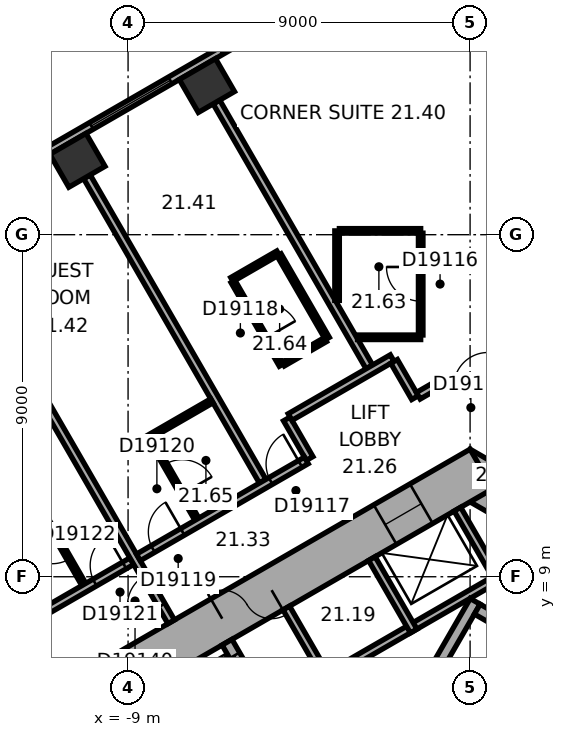
"""IFC4 building model, lengths in metres.
Left out: names, types, materials, properties, quantities, classifications, styles, units other than length and angle.
Written with IfcOpenShell. Run it as: python <this file> out.ifc"""

import sys

from ifc_helpers import new_model, si_unit, direction, frame, frame_2d, origin, origin_2d, place, context, subcontext, project, spatial, rectangle, extrude, element, fill, save


model = new_model("IFC4")
c1 = context("Model", 3, precision=1e-05, world=origin(), true_north=direction((0.0, 1.0)))
c2 = subcontext(c1, "Body", "Model", "MODEL_VIEW")
j1 = project(units=[si_unit("LENGTHUNIT", "METRE"), si_unit("PLANEANGLEUNIT", "RADIAN")], contexts=[c1])
p1 = place(None, origin())
s1 = spatial("IfcSite", under=j1, at=p1, CompositionType="ELEMENT")
p2 = place(p1, origin())
s2 = spatial("IfcBuilding", under=s1, at=p2, CompositionType="ELEMENT")
p3 = place(p2, frame((0.0, 0.0, 93.5)))
s3 = spatial("IfcBuildingStorey", under=s2, at=p3, CompositionType="ELEMENT", Elevation=93.5)
for number, where, z_axis, x_axis in (
    (1, (-6.926, 21.925, 0.0), (0.0, 0.0, 1.0), (-0.866, -0.5, 0.0)),
    (2, (-10.333, 19.957, 0.0), (0.0, 0.0, 1.0), (-0.866, -0.5, 0.0)),
):
    element("IfcColumn", number, at=place(p3, frame(where, z_axis=z_axis, x_axis=x_axis)), inside=s3, PredefinedType="COLUMN", context=c2, shape_type="SweptSolid", body=[
        extrude(rectangle(XDim=1.1, YDim=1.0, at=origin_2d()), origin(), (0.0, 0.0, 1.0), 3.3),
    ])
p4 = place(p3, frame((10.4, 5.658, 0.0), z_axis=(0.0, 0.0, 1.0), x_axis=(-0.866021384402, 0.500006961711, 0.0)))
e3 = element("IfcWall", 3, at=p4, inside=s3, PredefinedType="SHEAR", context=c2, shape_type="SweptSolid", body=[
    extrude(rectangle(XDim=12.355, YDim=1.2, at=frame_2d((6.178, 0.0))), origin(), (0.0, 0.0, 1.0), 3.3),
])
p5 = place(p4, frame((2.728, 0.0, 0.0)))
e4 = element("IfcOpeningElement", 4, at=p5, cuts=e3, PredefinedType="OPENING", context=c2, shape_type="SweptSolid", body=[
    extrude(rectangle(XDim=1.1, YDim=2.1, at=frame_2d((0.55, 1.05))), frame((0.0, 0.61, 0.0), z_axis=(0.0, -1.0, 0.0), x_axis=(1.0, 0.0, 0.0)), (0.0, 0.0, 1.0), 1.22),
])
p6 = place(p4, frame((5.328, 0.0, 0.0)))
e5 = element("IfcOpeningElement", 5, at=p6, cuts=e3, PredefinedType="OPENING", context=c2, shape_type="SweptSolid", body=[
    extrude(rectangle(XDim=1.1, YDim=2.1, at=frame_2d((0.55, 1.05))), frame((0.0, 0.61, 0.0), z_axis=(0.0, -1.0, 0.0), x_axis=(1.0, 0.0, 0.0)), (0.0, 0.0, 1.0), 1.22),
])
p7 = place(p4, frame((7.928, 0.0, 0.0)))
e6 = element("IfcOpeningElement", 6, at=p7, cuts=e3, PredefinedType="OPENING", context=c2, shape_type="SweptSolid", body=[
    extrude(rectangle(XDim=1.1, YDim=2.1, at=frame_2d((0.55, 1.05))), frame((0.0, 0.61, 0.0), z_axis=(0.0, -1.0, 0.0), x_axis=(1.0, 0.0, 0.0)), (0.0, 0.0, 1.0), 1.22),
])
p8 = place(p3, frame((0.3, 11.836, 0.0), z_axis=(0.0, 0.0, 1.0), x_axis=(-0.866021384402, -0.500006961711, 0.0)))
e7 = element("IfcWall", 7, at=p8, inside=s3, PredefinedType="SHEAR", context=c2, shape_type="SweptSolid", body=[
    extrude(rectangle(XDim=12.355, YDim=1.2, at=frame_2d((6.178, 0.0))), origin(), (0.0, 0.0, 1.0), 3.3),
])
p9 = place(p8, frame((6.378, 0.0, 0.0)))
e8 = element("IfcOpeningElement", 8, at=p9, cuts=e7, PredefinedType="OPENING", context=c2, shape_type="SweptSolid", body=[
    extrude(rectangle(XDim=1.5, YDim=2.1, at=frame_2d((0.75, 1.05))), frame((0.0, 0.61, 0.0), z_axis=(0.0, -1.0, 0.0), x_axis=(1.0, 0.0, 0.0)), (0.0, 0.0, 1.0), 1.22),
])
p10 = place(p8, frame((1.828, 0.0, 0.0)))
e9 = element("IfcOpeningElement", 9, at=p10, cuts=e7, PredefinedType="OPENING", context=c2, shape_type="SweptSolid", body=[
    extrude(rectangle(XDim=1.1, YDim=2.1, at=frame_2d((0.55, 1.05))), frame((0.0, 0.61, 0.0), z_axis=(0.0, -1.0, 0.0), x_axis=(1.0, 0.0, 0.0)), (0.0, 0.0, 1.0), 1.22),
])
p11 = place(p3, frame((-3.136, 24.805, 0.0), z_axis=(0.0, 0.0, 1.0), x_axis=(-0.866028291626, -0.499994998079, 0.0)))
e10 = element("IfcWall", 10, at=p11, inside=s3, PredefinedType="STANDARD", context=c2, shape_type="SweptSolid", body=[
    extrude(rectangle(XDim=21.246, YDim=0.2, at=frame_2d((10.623, 0.0))), origin(), (0.0, 0.0, 1.0), 3.3),
])
p12 = place(p11, frame((1.555, 0.0, 0.8)))
e11 = element("IfcOpeningElement", 11, at=p12, cuts=e10, PredefinedType="OPENING", context=c2, shape_type="SweptSolid", body=[
    extrude(rectangle(XDim=2.4, YDim=1.7, at=frame_2d((1.2, 0.85))), frame((0.0, 0.11, 0.0), z_axis=(0.0, -1.0, 0.0), x_axis=(1.0, 0.0, 0.0)), (0.0, 0.0, 1.0), 0.22),
])
p13 = place(p11, frame((5.489, 0.0, 0.8)))
e12 = element("IfcOpeningElement", 12, at=p13, cuts=e10, PredefinedType="OPENING", context=c2, shape_type="SweptSolid", body=[
    extrude(rectangle(XDim=2.4, YDim=1.7, at=frame_2d((1.2, 0.85))), frame((0.0, 0.11, 0.0), z_axis=(0.0, -1.0, 0.0), x_axis=(1.0, 0.0, 0.0)), (0.0, 0.0, 1.0), 0.22),
])
p14 = place(p11, frame((9.424, 0.0, 0.8)))
e13 = element("IfcOpeningElement", 13, at=p14, cuts=e10, PredefinedType="OPENING", context=c2, shape_type="SweptSolid", body=[
    extrude(rectangle(XDim=2.4, YDim=1.7, at=frame_2d((1.2, 0.85))), frame((0.0, 0.11, 0.0), z_axis=(0.0, -1.0, 0.0), x_axis=(1.0, 0.0, 0.0)), (0.0, 0.0, 1.0), 0.22),
])
p15 = place(p11, frame((13.358, 0.0, 0.8)))
e14 = element("IfcOpeningElement", 14, at=p15, cuts=e10, PredefinedType="OPENING", context=c2, shape_type="SweptSolid", body=[
    extrude(rectangle(XDim=2.4, YDim=1.7, at=frame_2d((1.2, 0.85))), frame((0.0, 0.11, 0.0), z_axis=(0.0, -1.0, 0.0), x_axis=(1.0, 0.0, 0.0)), (0.0, 0.0, 1.0), 0.22),
])
p16 = place(p11, frame((17.293, 0.0, 0.8)))
e15 = element("IfcOpeningElement", 15, at=p16, cuts=e10, PredefinedType="OPENING", context=c2, shape_type="SweptSolid", body=[
    extrude(rectangle(XDim=2.4, YDim=1.7, at=frame_2d((1.2, 0.85))), frame((0.0, 0.11, 0.0), z_axis=(0.0, -1.0, 0.0), x_axis=(1.0, 0.0, 0.0)), (0.0, 0.0, 1.0), 0.22),
])
p17 = place(p3, frame((0.803, 9.009, 0.0), z_axis=(0.0, 0.0, 1.0), x_axis=(-0.866028230842, -0.499995103361, 0.0)))
e16 = element("IfcWall", 16, at=p17, inside=s3, PredefinedType="PARTITIONING", context=c2, shape_type="SweptSolid", body=[
    extrude(rectangle(XDim=5.4, YDim=0.2, at=frame_2d((2.7, 0.0))), origin(), (0.0, 0.0, 1.0), 3.05),
])
p18 = place(p3, frame((0.767, 8.872, 0.0), z_axis=(0.0, 0.0, 1.0), x_axis=(-0.499994660107, 0.866028486751, 0.0)))
e17 = element("IfcWall", 17, at=p18, inside=s3, PredefinedType="PARTITIONING", context=c2, shape_type="SweptSolid", body=[
    extrude(rectangle(XDim=2.2, YDim=0.2, at=frame_2d((1.1, 0.0))), origin(), (0.0, 0.0, 1.0), 3.05),
])
for number, where, z_axis, x_axis in (
    (18, (-1.485, 7.572, 0.0), (0.0, 0.0, 1.0), (-0.5, 0.866, 0.0)),
    (19, (-3.737, 6.272, 0.0), (0.0, 0.0, 1.0), (-0.5, 0.866, 0.0)),
):
    element("IfcWall", number, at=place(p3, frame(where, z_axis=z_axis, x_axis=x_axis)), inside=s3, PredefinedType="PARTITIONING", context=c2, shape_type="SweptSolid", body=[
        extrude(rectangle(XDim=2.2, YDim=0.2, at=frame_2d((1.1, 0.0))), origin(), (0.0, 0.0, 1.0), 3.05),
    ])
p19 = place(p3, frame((-2.216, 4.282, 0.0), z_axis=(0.0, 0.0, 1.0), x_axis=(0.499977259774, 0.866038532462, 0.0)))
e20 = element("IfcWall", 20, at=p19, inside=s3, PredefinedType="SHEAR", context=c2, shape_type="SweptSolid", body=[
    extrude(rectangle(XDim=4.7, YDim=0.3, at=frame_2d((2.35, 0.0))), origin(), (0.0, 0.0, 1.0), 3.05),
])
p20 = place(p3, frame((6.303, 4.617, 0.0), z_axis=(0.0, 0.0, 1.0), x_axis=(-0.866027801685, 0.499995846692, 0.0)))
e21 = element("IfcWall", 21, at=p20, inside=s3, PredefinedType="SHEAR", context=c2, shape_type="SweptSolid", body=[
    extrude(rectangle(XDim=7.06, YDim=0.3, at=frame_2d((3.53, 0.0))), origin(), (0.0, 0.0, 1.0), 3.05),
])
p21 = place(p3, frame((-5.295, 5.372, 0.0), z_axis=(0.0, 0.0, 1.0), x_axis=(-0.500077893725, 0.86598042715, 0.0)))
e22 = element("IfcWall", 22, at=p21, inside=s3, PredefinedType="SHEAR", context=c2, shape_type="SweptSolid", body=[
    extrude(rectangle(XDim=2.2, YDim=0.3, at=frame_2d((1.1, 0.0))), origin(), (0.0, 0.0, 1.0), 3.05),
])
p22 = place(p21, frame((0.7, 0.0, 0.0)))
e23 = element("IfcOpeningElement", 23, at=p22, cuts=e22, PredefinedType="OPENING", context=c2, shape_type="SweptSolid", body=[
    extrude(rectangle(XDim=1.1, YDim=2.1, at=frame_2d((0.55, 1.05))), frame((0.0, 0.16, 0.0), z_axis=(0.0, -1.0, 0.0), x_axis=(1.0, 0.0, 0.0)), (0.0, 0.0, 1.0), 0.32),
])
p23 = place(p3, frame((-11.385, 10.909, 0.0), z_axis=(0.0, 0.0, 1.0), x_axis=(0.500077547548, -0.865980627057, 0.0)))
e24 = element("IfcWall", 24, at=p23, inside=s3, PredefinedType="PARTITIONING", context=c2, shape_type="SweptSolid", body=[
    extrude(rectangle(XDim=2.44, YDim=0.12, at=frame_2d((1.22, 0.0))), origin(), (0.0, 0.0, 1.0), 3.05),
])
p24 = place(p23, frame((0.77, 0.0, 0.0)))
e25 = element("IfcOpeningElement", 25, at=p24, cuts=e24, PredefinedType="OPENING", context=c2, shape_type="SweptSolid", body=[
    extrude(rectangle(XDim=0.9, YDim=2.1, at=frame_2d((0.45, 1.05))), frame((0.0, 0.07, 0.0), z_axis=(0.0, -1.0, 0.0), x_axis=(1.0, 0.0, 0.0)), (0.0, 0.0, 1.0), 0.14),
])
p25 = place(p3, frame((-10.083, 19.524, 0.0), z_axis=(0.0, 0.0, 1.0), x_axis=(0.499999662836, -0.866025598446, 0.0)))
e26 = element("IfcWall", 26, at=p25, inside=s3, PredefinedType="PARTITIONING", context=c2, shape_type="SweptSolid", body=[
    extrude(rectangle(XDim=9.25, YDim=0.2, at=frame_2d((4.625, 0.0))), origin(), (0.0, 0.0, 1.0), 2.6),
])
p26 = place(p3, frame((-8.902, 9.41, 0.0), z_axis=(0.0, 0.0, 1.0), x_axis=(-0.866014299198, -0.500019233215, 0.0)))
e27 = element("IfcWall", 27, at=p26, inside=s3, PredefinedType="PARTITIONING", context=c2, shape_type="SweptSolid", body=[
    extrude(rectangle(XDim=3.133, YDim=0.2, at=frame_2d((1.567, 0.0))), origin(), (0.0, 0.0, 1.0), 3.05),
])
p27 = place(p26, frame((0.225, 0.0, 0.0)))
e28 = element("IfcOpeningElement", 28, at=p27, cuts=e27, PredefinedType="OPENING", context=c2, shape_type="SweptSolid", body=[
    extrude(rectangle(XDim=0.9, YDim=2.1, at=frame_2d((0.45, 1.05))), frame((0.0, 0.11, 0.0), z_axis=(0.0, -1.0, 0.0), x_axis=(1.0, 0.0, 0.0)), (0.0, 0.0, 1.0), 0.22),
])
p28 = place(p3, frame((-8.44, 12.679, 0.0), z_axis=(0.0, 0.0, 1.0), x_axis=(0.866044365799, 0.499967155389, 0.0)))
e29 = element("IfcWall", 29, at=p28, inside=s3, PredefinedType="PARTITIONING", context=c2, shape_type="SweptSolid", body=[
    extrude(rectangle(XDim=1.9, YDim=0.12, at=frame_2d((0.95, 0.0))), origin(), (0.0, 0.0, 1.0), 3.05),
])
p29 = place(p3, frame((-7.865, 7.814, 0.0), z_axis=(0.0, 0.0, 1.0), x_axis=(-0.500004234368, 0.866022959057, 0.0)))
e30 = element("IfcWall", 30, at=p29, inside=s3, PredefinedType="PARTITIONING", context=c2, shape_type="SweptSolid", body=[
    extrude(rectangle(XDim=11.25, YDim=0.2, at=frame_2d((5.625, 0.0))), origin(), (0.0, 0.0, 1.0), 3.05),
])
p30 = place(p29, frame((0.5, 0.0, 0.0)))
e31 = element("IfcOpeningElement", 31, at=p30, cuts=e30, PredefinedType="OPENING", context=c2, shape_type="SweptSolid", body=[
    extrude(rectangle(XDim=0.9, YDim=2.1, at=frame_2d((0.45, 1.05))), frame((0.0, 0.11, 0.0), z_axis=(0.0, -1.0, 0.0), x_axis=(1.0, 0.0, 0.0)), (0.0, 0.0, 1.0), 0.22),
])
p31 = place(p3, frame((-7.19, 10.513, 0.0), z_axis=(0.0, 0.0, 1.0), x_axis=(-0.499959183527, 0.866048967903, 0.0)))
e32 = element("IfcWall", 32, at=p31, inside=s3, PredefinedType="PARTITIONING", context=c2, shape_type="SweptSolid", body=[
    extrude(rectangle(XDim=2.44, YDim=0.12, at=frame_2d((1.22, 0.0))), origin(), (0.0, 0.0, 1.0), 3.05),
])
p32 = place(p31, frame((0.77, 0.0, 0.0)))
e33 = element("IfcOpeningElement", 33, at=p32, cuts=e32, PredefinedType="OPENING", context=c2, shape_type="SweptSolid", body=[
    extrude(rectangle(XDim=0.9, YDim=2.1, at=frame_2d((0.45, 1.05))), frame((0.0, 0.07, 0.0), z_axis=(0.0, -1.0, 0.0), x_axis=(1.0, 0.0, 0.0)), (0.0, 0.0, 1.0), 0.14),
])
p33 = place(p3, frame((-6.676, 21.492, 0.0), z_axis=(0.0, 0.0, 1.0), x_axis=(0.500011263043, -0.866018900966, 0.0)))
e34 = element("IfcWall", 34, at=p33, inside=s3, PredefinedType="PARTITIONING", context=c2, shape_type="SweptSolid", body=[
    extrude(rectangle(XDim=8.049, YDim=0.2, at=frame_2d((4.024, 0.0))), origin(), (0.0, 0.0, 1.0), 3.05),
])
p34 = place(p3, frame((-6.268, 16.82, 0.0), z_axis=(0.0, 0.0, 1.0), x_axis=(0.866002662425, 0.500039387122, 0.0)))
e35 = element("IfcWall", 35, at=p34, inside=s3, PredefinedType="PARTITIONING", context=c2, shape_type="SweptSolid", body=[
    extrude(rectangle(XDim=1.4, YDim=0.12, at=frame_2d((0.7, 0.0))), origin(), (0.0, 0.0, 1.0), 3.05),
])
p35 = place(p3, frame((-5.026, 17.469, 0.0), z_axis=(0.0, 0.0, 1.0), x_axis=(0.500005339912, -0.866022320763, 0.0)))
e36 = element("IfcWall", 36, at=p35, inside=s3, PredefinedType="PARTITIONING", context=c2, shape_type="SweptSolid", body=[
    extrude(rectangle(XDim=2.54, YDim=0.12, at=frame_2d((1.27, 0.0))), origin(), (0.0, 0.0, 1.0), 3.05),
])
p36 = place(p3, frame((-4.968, 14.569, 0.0), z_axis=(0.0, 0.0, 1.0), x_axis=(-0.500046963369, 0.865998287773, 0.0)))
e37 = element("IfcWall", 37, at=p36, inside=s3, PredefinedType="PARTITIONING", context=c2, shape_type="SweptSolid", body=[
    extrude(rectangle(XDim=2.54, YDim=0.12, at=frame_2d((1.27, 0.0))), origin(), (0.0, 0.0, 1.0), 3.05),
])
p37 = place(p36, frame((0.82, 0.0, 0.0)))
e38 = element("IfcOpeningElement", 38, at=p37, cuts=e37, PredefinedType="OPENING", context=c2, shape_type="SweptSolid", body=[
    extrude(rectangle(XDim=0.9, YDim=2.1, at=frame_2d((0.45, 1.05))), frame((0.0, 0.07, 0.0), z_axis=(0.0, -1.0, 0.0), x_axis=(1.0, 0.0, 0.0)), (0.0, 0.0, 1.0), 0.14),
])
p38 = place(p3, frame((-4.823, 13.152, 0.0), z_axis=(0.0, 0.0, 1.0), x_axis=(0.499986357472, -0.866033280158, 0.0)))
e39 = element("IfcWall", 39, at=p38, inside=s3, PredefinedType="PARTITIONING", context=c2, shape_type="SweptSolid", body=[
    extrude(rectangle(XDim=1.201, YDim=0.2, at=frame_2d((0.601, 0.0))), origin(), (0.0, 0.0, 1.0), 3.05),
])
p39 = place(p3, frame((-4.309, 12.061, 0.0), z_axis=(0.0, 0.0, 1.0), x_axis=(-0.866020679205, -0.500008183122, 0.0)))
e40 = element("IfcWall", 40, at=p39, inside=s3, PredefinedType="PARTITIONING", context=c2, shape_type="SweptSolid", body=[
    extrude(rectangle(XDim=5.104, YDim=0.2, at=frame_2d((2.552, 0.0))), origin(), (0.0, 0.0, 1.0), 3.05),
])
p40 = place(p39, frame((0.185, 0.0, 0.0)))
e41 = element("IfcOpeningElement", 41, at=p40, cuts=e40, PredefinedType="OPENING", context=c2, shape_type="SweptSolid", body=[
    extrude(rectangle(XDim=0.9, YDim=2.1, at=frame_2d((0.45, 1.05))), frame((0.0, 0.11, 0.0), z_axis=(0.0, -1.0, 0.0), x_axis=(1.0, 0.0, 0.0)), (0.0, 0.0, 1.0), 0.22),
])
p41 = place(p39, frame((3.761, 0.0, 0.0)))
e42 = element("IfcOpeningElement", 42, at=p41, cuts=e40, PredefinedType="OPENING", context=c2, shape_type="SweptSolid", body=[
    extrude(rectangle(XDim=0.9, YDim=2.1, at=frame_2d((0.45, 1.05))), frame((0.0, 0.11, 0.0), z_axis=(0.0, -1.0, 0.0), x_axis=(1.0, 0.0, 0.0)), (0.0, 0.0, 1.0), 0.22),
])
p42 = place(p3, frame((-3.808, 15.239, 0.0), z_axis=(0.0, 0.0, 1.0), x_axis=(-0.866087136806, -0.499893060024, 0.0)))
e43 = element("IfcWall", 43, at=p42, inside=s3, PredefinedType="PARTITIONING", context=c2, shape_type="SweptSolid", body=[
    extrude(rectangle(XDim=1.28, YDim=0.12, at=frame_2d((0.64, 0.0))), origin(), (0.0, 0.0, 1.0), 3.05),
])
p43 = place(p3, frame((-3.5, 16.271, 0.0), z_axis=(0.0, 0.0, 1.0), x_axis=(0.0, 1.0, 0.0)))
e44 = element("IfcWall", 44, at=p43, inside=s3, PredefinedType="PARTITIONING", context=c2, shape_type="SweptSolid", body=[
    extrude(rectangle(XDim=1.829, YDim=0.12, at=frame_2d((0.915, 0.0))), origin(), (0.0, 0.0, 1.0), 3.05),
])
p44 = place(p3, frame((-3.44, 18.101, 0.0), z_axis=(0.0, 0.0, 1.0), x_axis=(1.0, 0.0, 0.0)))
e45 = element("IfcWall", 45, at=p44, inside=s3, PredefinedType="PARTITIONING", context=c2, shape_type="SweptSolid", body=[
    extrude(rectangle(XDim=2.14, YDim=0.12, at=frame_2d((1.07, 0.0))), origin(), (0.0, 0.0, 1.0), 3.05),
])
p45 = place(p3, frame((-2.05, 14.752, 0.0), z_axis=(0.0, 0.0, 1.0), x_axis=(-0.866030936828, -0.499990416364, 0.0)))
e46 = element("IfcWall", 46, at=p45, inside=s3, PredefinedType="PARTITIONING", context=c2, shape_type="SweptSolid", body=[
    extrude(rectangle(XDim=3.102, YDim=0.2, at=frame_2d((1.551, 0.0))), origin(), (0.0, 0.0, 1.0), 3.05),
])
p46 = place(p3, frame((-1.449, 13.712, 0.0), z_axis=(0.0, 0.0, 1.0), x_axis=(-0.499978356969, 0.866037899034, 0.0)))
e47 = element("IfcWall", 47, at=p46, inside=s3, PredefinedType="PARTITIONING", context=c2, shape_type="SweptSolid", body=[
    extrude(rectangle(XDim=1.101, YDim=0.2, at=frame_2d((0.551, 0.0))), origin(), (0.0, 0.0, 1.0), 3.05),
])
p47 = place(p3, frame((-1.3, 15.301, 0.0), z_axis=(0.0, 0.0, 1.0), x_axis=(-1.0, 0.0, 0.0)))
e48 = element("IfcWall", 48, at=p47, inside=s3, PredefinedType="PARTITIONING", context=c2, shape_type="SweptSolid", body=[
    extrude(rectangle(XDim=1.661, YDim=0.12, at=frame_2d((0.831, 0.0))), origin(), (0.0, 0.0, 1.0), 3.05),
])
p48 = place(p3, frame((-1.3, 18.041, 0.0), z_axis=(0.0, 0.0, 1.0), x_axis=(0.0, -1.0, 0.0)))
e49 = element("IfcWall", 49, at=p48, inside=s3, PredefinedType="PARTITIONING", context=c2, shape_type="SweptSolid", body=[
    extrude(rectangle(XDim=2.68, YDim=0.12, at=frame_2d((1.34, 0.0))), origin(), (0.0, 0.0, 1.0), 3.05),
])
p49 = place(p48, frame((0.89, 0.0, 0.0)))
e50 = element("IfcOpeningElement", 50, at=p49, cuts=e49, PredefinedType="OPENING", context=c2, shape_type="SweptSolid", body=[
    extrude(rectangle(XDim=0.9, YDim=2.1, at=frame_2d((0.45, 1.05))), frame((0.0, 0.07, 0.0), z_axis=(0.0, -1.0, 0.0), x_axis=(1.0, 0.0, 0.0)), (0.0, 0.0, 1.0), 0.14),
])
p50 = place(p3, frame((-0.95, 14.001, 0.0), z_axis=(0.0, 0.0, 1.0), x_axis=(-0.86609177584, -0.499885022602, 0.0)))
e51 = element("IfcWall", 51, at=p50, inside=s3, PredefinedType="PARTITIONING", context=c2, shape_type="SweptSolid", body=[
    extrude(rectangle(XDim=0.477, YDim=0.2, at=frame_2d((0.238, 0.0))), origin(), (0.0, 0.0, 1.0), 3.05),
])
p51 = place(p3, frame((0.95, 14.001, 0.0), z_axis=(0.0, 0.0, 1.0), x_axis=(-1.0, 0.0, 0.0)))
e52 = element("IfcWall", 52, at=p51, inside=s3, PredefinedType="PARTITIONING", context=c2, shape_type="SweptSolid", body=[
    extrude(rectangle(XDim=1.86, YDim=0.2, at=frame_2d((0.93, 0.0))), origin(), (0.0, 0.0, 1.0), 3.05),
])
p52 = place(p51, frame((0.48, 0.0, 0.0)))
e53 = element("IfcOpeningElement", 53, at=p52, cuts=e52, PredefinedType="OPENING", context=c2, shape_type="SweptSolid", body=[
    extrude(rectangle(XDim=0.9, YDim=2.1, at=frame_2d((0.45, 1.05))), frame((0.0, 0.11, 0.0), z_axis=(0.0, -1.0, 0.0), x_axis=(1.0, 0.0, 0.0)), (0.0, 0.0, 1.0), 0.22),
])
p53 = place(p13, origin())
e54 = element("IfcWindow", 54, at=p53, inside=s3, PartitioningType="SINGLE_PANEL", PredefinedType="WINDOW", context=c2, shape_type="SweptSolid", body=[
    extrude(rectangle(XDim=2.4, YDim=1.7, at=frame_2d((1.2, 0.85))), frame((0.0, 0.03, 0.0), z_axis=(0.0, -1.0, 0.0), x_axis=(1.0, 0.0, 0.0)), (0.0, 0.0, 1.0), 0.06),
])
fill(e12, e54)
p54 = place(p9, origin())
e55 = element("IfcDoor", 55, at=p54, inside=s3, OperationType="DOUBLE_DOOR_SINGLE_SWING", PredefinedType="DOOR", context=c2, shape_type="SweptSolid", body=[
    extrude(rectangle(XDim=1.5, YDim=2.1, at=frame_2d((0.75, 1.05))), frame((0.0, 0.025, 0.0), z_axis=(0.0, -1.0, 0.0), x_axis=(1.0, 0.0, 0.0)), (0.0, 0.0, 1.0), 0.05),
])
fill(e8, e55)
p55 = place(p22, origin())
e56 = element("IfcDoor", 56, at=p55, inside=s3, OperationType="DOUBLE_DOOR_SLIDING", PredefinedType="DOOR", context=c2, shape_type="SweptSolid", body=[
    extrude(rectangle(XDim=1.1, YDim=2.1, at=frame_2d((0.55, 1.05))), frame((0.0, 0.025, 0.0), z_axis=(0.0, -1.0, 0.0), x_axis=(1.0, 0.0, 0.0)), (0.0, 0.0, 1.0), 0.05),
])
fill(e23, e56)
p56 = place(p10, origin())
e57 = element("IfcDoor", 57, at=p56, inside=s3, OperationType="DOUBLE_DOOR_SLIDING", PredefinedType="DOOR", context=c2, shape_type="SweptSolid", body=[
    extrude(rectangle(XDim=1.1, YDim=2.1, at=frame_2d((0.55, 1.05))), frame((0.0, 0.025, 0.0), z_axis=(0.0, -1.0, 0.0), x_axis=(1.0, 0.0, 0.0)), (0.0, 0.0, 1.0), 0.05),
])
fill(e9, e57)
p57 = place(p52, origin())
e58 = element("IfcDoor", 58, at=p57, inside=s3, OperationType="SINGLE_SWING_LEFT", PredefinedType="DOOR", context=c2, shape_type="SweptSolid", body=[
    extrude(rectangle(XDim=0.9, YDim=2.1, at=frame_2d((0.45, 1.05))), frame((0.0, 0.025, 0.0), z_axis=(0.0, -1.0, 0.0), x_axis=(1.0, 0.0, 0.0)), (0.0, 0.0, 1.0), 0.05),
])
fill(e53, e58)
p58 = place(p49, origin())
e59 = element("IfcDoor", 59, at=p58, inside=s3, OperationType="SINGLE_SWING_LEFT", PredefinedType="DOOR", context=c2, shape_type="SweptSolid", body=[
    extrude(rectangle(XDim=0.9, YDim=2.1, at=frame_2d((0.45, 1.05))), frame((0.0, 0.025, 0.0), z_axis=(0.0, -1.0, 0.0), x_axis=(1.0, 0.0, 0.0)), (0.0, 0.0, 1.0), 0.05),
])
fill(e50, e59)
p59 = place(p40, origin())
e60 = element("IfcDoor", 60, at=p59, inside=s3, OperationType="SINGLE_SWING_LEFT", PredefinedType="DOOR", context=c2, shape_type="SweptSolid", body=[
    extrude(rectangle(XDim=0.9, YDim=2.1, at=frame_2d((0.45, 1.05))), frame((0.0, 0.025, 0.0), z_axis=(0.0, -1.0, 0.0), x_axis=(1.0, 0.0, 0.0)), (0.0, 0.0, 1.0), 0.05),
])
fill(e41, e60)
p60 = place(p37, origin())
e61 = element("IfcDoor", 61, at=p60, inside=s3, OperationType="SINGLE_SWING_LEFT", PredefinedType="DOOR", context=c2, shape_type="SweptSolid", body=[
    extrude(rectangle(XDim=0.9, YDim=2.1, at=frame_2d((0.45, 1.05))), frame((0.0, 0.025, 0.0), z_axis=(0.0, -1.0, 0.0), x_axis=(1.0, 0.0, 0.0)), (0.0, 0.0, 1.0), 0.05),
])
fill(e38, e61)
p61 = place(p41, origin())
e62 = element("IfcDoor", 62, at=p61, inside=s3, OperationType="SINGLE_SWING_LEFT", PredefinedType="DOOR", context=c2, shape_type="SweptSolid", body=[
    extrude(rectangle(XDim=0.9, YDim=2.1, at=frame_2d((0.45, 1.05))), frame((0.0, 0.025, 0.0), z_axis=(0.0, -1.0, 0.0), x_axis=(1.0, 0.0, 0.0)), (0.0, 0.0, 1.0), 0.05),
])
fill(e42, e62)
p62 = place(p32, origin())
e63 = element("IfcDoor", 63, at=p62, inside=s3, OperationType="SINGLE_SWING_LEFT", PredefinedType="DOOR", context=c2, shape_type="SweptSolid", body=[
    extrude(rectangle(XDim=0.9, YDim=2.1, at=frame_2d((0.45, 1.05))), frame((0.0, 0.025, 0.0), z_axis=(0.0, -1.0, 0.0), x_axis=(1.0, 0.0, 0.0)), (0.0, 0.0, 1.0), 0.05),
])
fill(e33, e63)
p63 = place(p27, origin())
e64 = element("IfcDoor", 64, at=p63, inside=s3, OperationType="SINGLE_SWING_LEFT", PredefinedType="DOOR", context=c2, shape_type="SweptSolid", body=[
    extrude(rectangle(XDim=0.9, YDim=2.1, at=frame_2d((0.45, 1.05))), frame((0.0, 0.025, 0.0), z_axis=(0.0, -1.0, 0.0), x_axis=(1.0, 0.0, 0.0)), (0.0, 0.0, 1.0), 0.05),
])
fill(e28, e64)
p64 = place(p24, origin())
e65 = element("IfcDoor", 65, at=p64, inside=s3, OperationType="SINGLE_SWING_LEFT", PredefinedType="DOOR", context=c2, shape_type="SweptSolid", body=[
    extrude(rectangle(XDim=0.9, YDim=2.1, at=frame_2d((0.45, 1.05))), frame((0.0, 0.025, 0.0), z_axis=(0.0, -1.0, 0.0), x_axis=(1.0, 0.0, 0.0)), (0.0, 0.0, 1.0), 0.05),
])
fill(e25, e65)
p65 = place(p30, origin())
e66 = element("IfcDoor", 66, at=p65, inside=s3, OperationType="SINGLE_SWING_LEFT", PredefinedType="DOOR", context=c2, shape_type="SweptSolid", body=[
    extrude(rectangle(XDim=0.9, YDim=2.1, at=frame_2d((0.45, 1.05))), frame((0.0, 0.025, 0.0), z_axis=(0.0, -1.0, 0.0), x_axis=(1.0, 0.0, 0.0)), (0.0, 0.0, 1.0), 0.05),
])
fill(e31, e66)
save(model, sys.argv[1])
